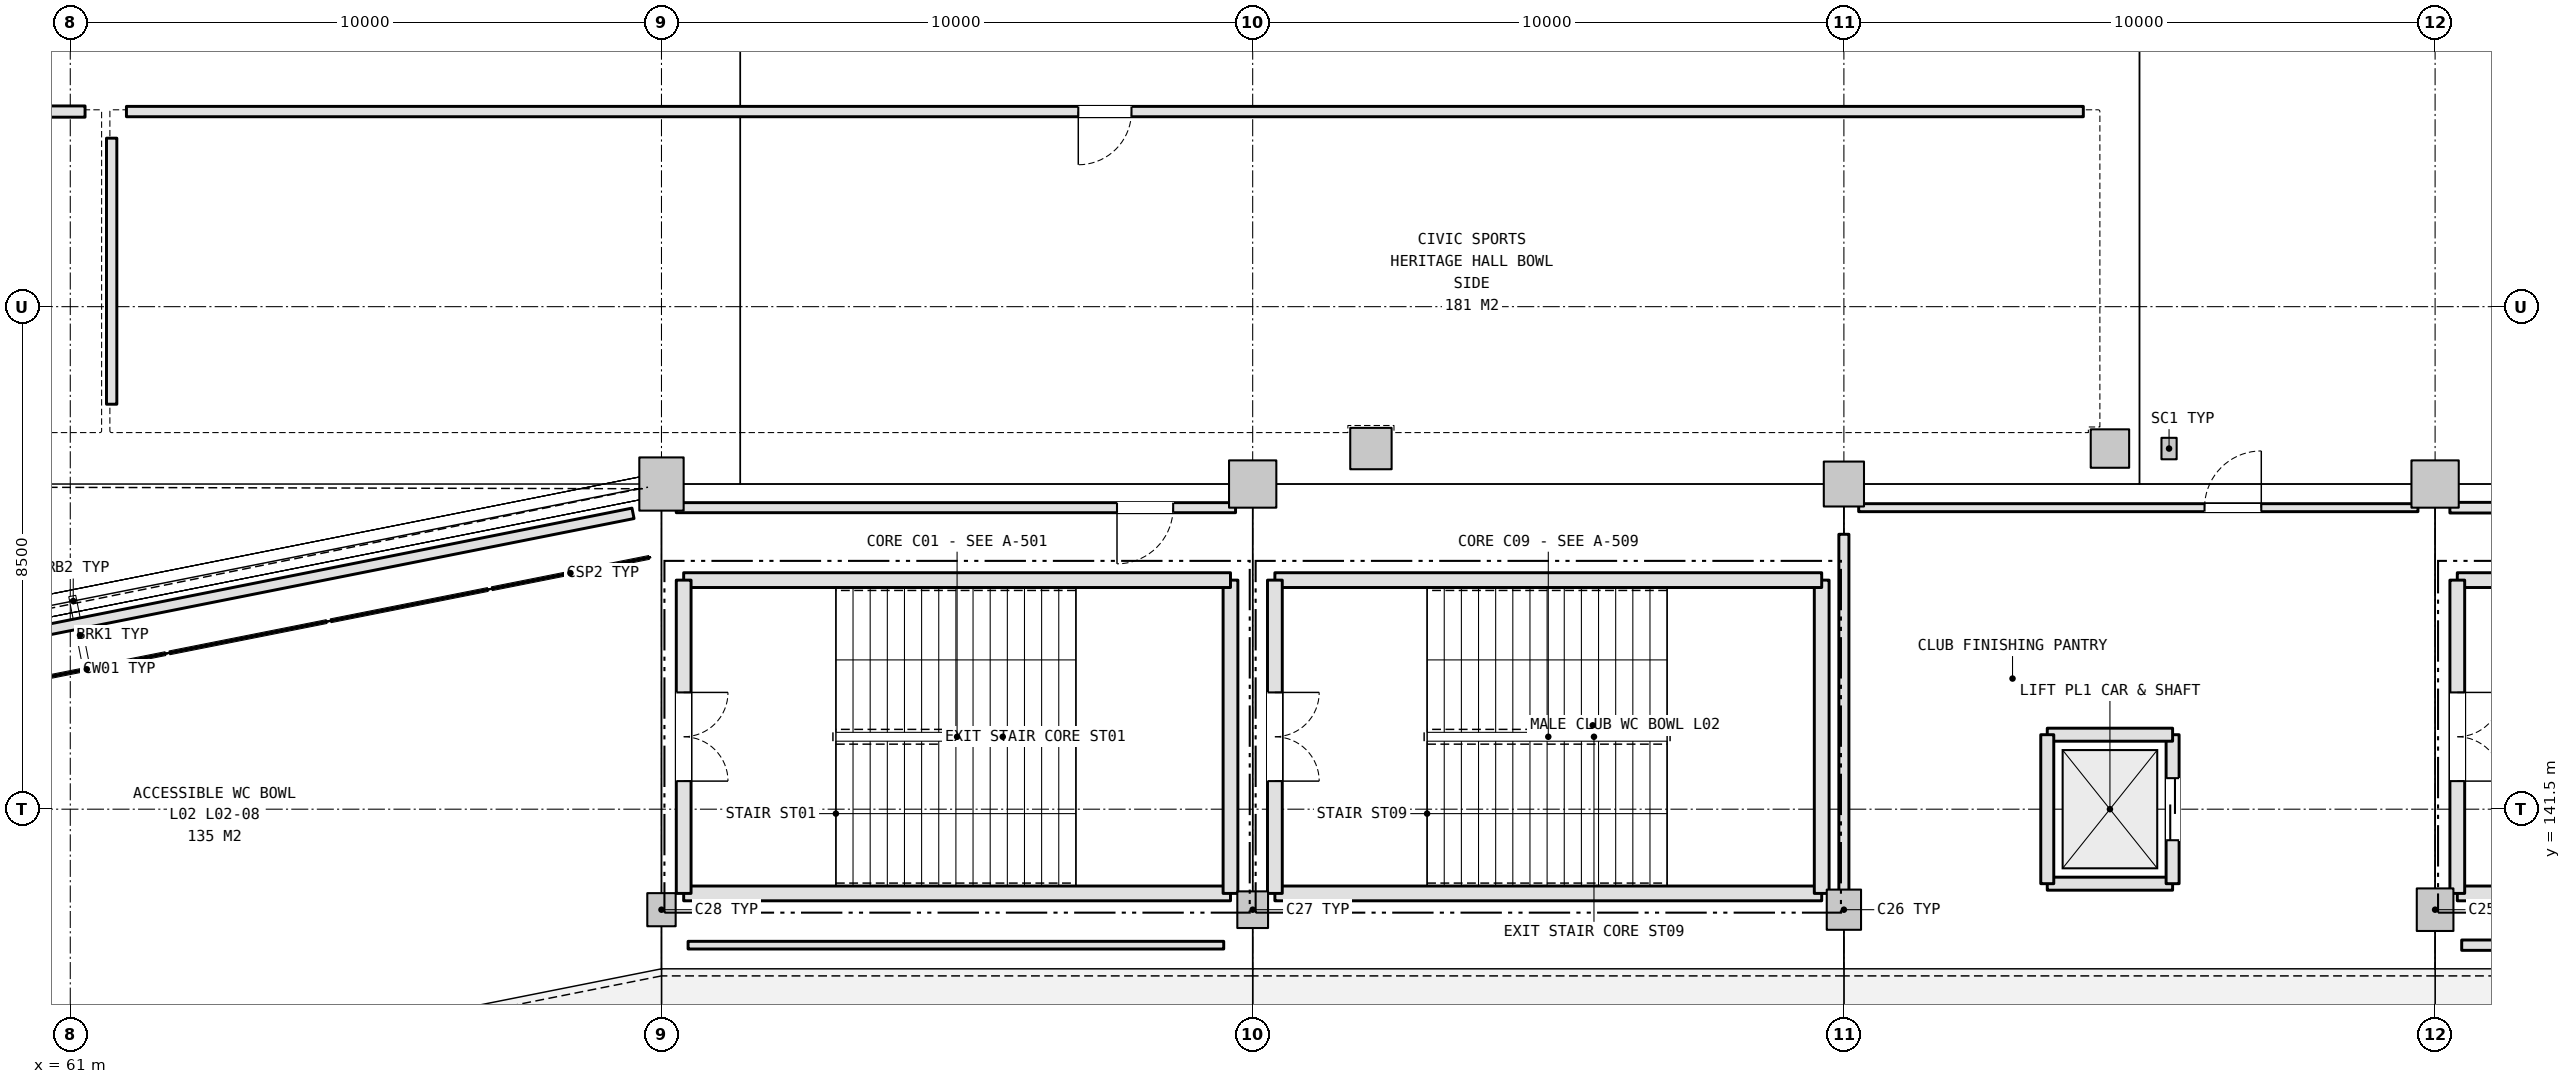
"""IFC4 building model, lengths in metres.
Left out: names, types, materials, properties, quantities, classifications, styles, units other than length and angle.
Written with IfcOpenShell. Run it as: python <this file> out.ifc"""

import sys

from ifc_helpers import new_model, si_unit, direction, frame, frame_2d, origin, origin_2d, place, context, subcontext, project, spatial, rectangle, i_section, extrude, element, fill, save


model = new_model("IFC4")
c1 = context("Model", 3, precision=1e-05, world=origin(), true_north=direction((0.0, 1.0)))
c2 = subcontext(c1, "Body", "Model", "MODEL_VIEW")
j1 = project(units=[si_unit("LENGTHUNIT", "METRE"), si_unit("PLANEANGLEUNIT", "RADIAN")], contexts=[c1])
p1 = place(None, origin())
s1 = spatial("IfcSite", under=j1, at=p1, CompositionType="ELEMENT")
p2 = place(p1, origin())
s2 = spatial("IfcBuilding", under=s1, at=p2, CompositionType="ELEMENT")
p3 = place(p2, frame((0.0, 0.0, 10.8)))
s3 = spatial("IfcBuildingStorey", under=s2, at=p3, CompositionType="ELEMENT", Elevation=10.8)
p4 = place(p3, frame((101.0, 139.8, 0.0), z_axis=(0.0, 0.0, 1.0), x_axis=(1.0, 0.0, 0.0)))
e1 = element("IfcColumn", 1, at=p4, inside=s3, PredefinedType="COLUMN", context=c2, shape_type="SweptSolid", body=[
    extrude(rectangle(XDim=0.62, YDim=0.72, at=origin_2d()), origin(), (0.0, 0.0, 1.0), 5.4),
])
p5 = place(p3, frame((101.0, 147.0, 0.0), z_axis=(0.0, 0.0, 1.0), x_axis=(1.0, 0.0, 0.0)))
e2 = element("IfcColumn", 2, at=p5, inside=s3, PredefinedType="COLUMN", context=c2, shape_type="SweptSolid", body=[
    extrude(rectangle(XDim=0.8, YDim=0.8, at=origin_2d()), origin(), (0.0, 0.0, 1.0), 5.4),
])
p6 = place(p3, frame((91.0, 139.8, 0.0), z_axis=(0.0, 0.0, 1.0), x_axis=(1.0, 0.0, 0.0)))
e3 = element("IfcColumn", 3, at=p6, inside=s3, PredefinedType="COLUMN", context=c2, shape_type="SweptSolid", body=[
    extrude(rectangle(XDim=0.58, YDim=0.68, at=origin_2d()), origin(), (0.0, 0.0, 1.0), 5.4),
])
p7 = place(p3, frame((91.0, 147.0, 0.0), z_axis=(0.0, 0.0, 1.0), x_axis=(1.0, 0.0, 0.0)))
e4 = element("IfcColumn", 4, at=p7, inside=s3, PredefinedType="COLUMN", context=c2, shape_type="SweptSolid", body=[
    extrude(rectangle(XDim=0.68, YDim=0.76, at=origin_2d()), origin(), (0.0, 0.0, 1.0), 5.4),
])
p8 = place(p3, frame((81.0, 139.8, 0.0), z_axis=(0.0, 0.0, 1.0), x_axis=(1.0, 0.0, 0.0)))
e5 = element("IfcColumn", 5, at=p8, inside=s3, PredefinedType="COLUMN", context=c2, shape_type="SweptSolid", body=[
    extrude(rectangle(XDim=0.52, YDim=0.62, at=origin_2d()), origin(), (0.0, 0.0, 1.0), 5.4),
])
p9 = place(p3, frame((81.0, 147.0, 0.0), z_axis=(0.0, 0.0, 1.0), x_axis=(1.0, 0.0, 0.0)))
e6 = element("IfcColumn", 6, at=p9, inside=s3, PredefinedType="COLUMN", context=c2, shape_type="SweptSolid", body=[
    extrude(rectangle(XDim=0.8, YDim=0.8, at=origin_2d()), origin(), (0.0, 0.0, 1.0), 5.4),
])
p10 = place(p3, frame((71.0, 139.8, 0.0), z_axis=(0.0, 0.0, 1.0), x_axis=(1.0, 0.0, 0.0)))
e7 = element("IfcColumn", 7, at=p10, inside=s3, PredefinedType="COLUMN", context=c2, shape_type="SweptSolid", body=[
    extrude(rectangle(XDim=0.48, YDim=0.56, at=origin_2d()), origin(), (0.0, 0.0, 1.0), 5.4),
])
p11 = place(p3, frame((71.0, 147.0, 0.0), z_axis=(0.0, 0.0, 1.0), x_axis=(1.0, 0.0, 0.0)))
e8 = element("IfcColumn", 8, at=p11, inside=s3, PredefinedType="COLUMN", context=c2, shape_type="SweptSolid", body=[
    extrude(rectangle(XDim=0.75, YDim=0.9, at=origin_2d()), origin(), (0.0, 0.0, 1.0), 5.4),
])
p12 = place(p3, frame((83.0, 147.6, 0.0), z_axis=(0.0, 0.0, 1.0), x_axis=(1.0, 0.0, 0.0)))
e9 = element("IfcColumn", 9, at=p12, inside=s3, PredefinedType="COLUMN", context=c2, shape_type="SweptSolid", body=[
    extrude(rectangle(XDim=0.7, YDim=0.7, at=origin_2d()), origin(), (0.0, 0.0, 1.0), 5.4),
])
p13 = place(p3, frame((95.5, 147.6, 0.0), z_axis=(0.0, 0.0, 1.0), x_axis=(1.0, 0.0, 0.0)))
e10 = element("IfcColumn", 10, at=p13, inside=s3, PredefinedType="COLUMN", context=c2, shape_type="SweptSolid", body=[
    extrude(rectangle(XDim=0.65, YDim=0.65, at=origin_2d()), origin(), (0.0, 0.0, 1.0), 5.4),
])
p14 = place(p3, frame((96.5, 147.6, 0.0), z_axis=(0.0, 0.0, 1.0), x_axis=(1.0, 0.0, 0.0)))
e11 = element("IfcColumn", 11, at=p14, inside=s3, PredefinedType="COLUMN", context=c2, shape_type="SweptSolid", body=[
    extrude(i_section(OverallWidth=0.257, OverallDepth=0.363, WebThickness=0.013, FlangeThickness=0.022, FilletRadius=0.015, at=origin_2d()), origin(), (0.0, 0.0, 1.0), 5.4),
])
p15 = place(p3, frame((71.375, 140.075, 0.0), z_axis=(0.0, 0.0, 1.0), x_axis=(1.0, 0.0, 0.0)))
e12 = element("IfcWall", 12, at=p15, inside=s3, PredefinedType="SHEAR", context=c2, shape_type="SweptSolid", body=[
    extrude(rectangle(XDim=9.249, YDim=0.25, at=frame_2d((4.625, 0.0))), origin(), (0.0, 0.0, 1.0), 5.15),
])
p16 = place(p3, frame((80.625, 140.075, 0.0), z_axis=(0.0, 0.0, 1.0), x_axis=(0.0, 1.0, 0.0)))
e13 = element("IfcWall", 13, at=p16, inside=s3, PredefinedType="SHEAR", context=c2, shape_type="SweptSolid", body=[
    extrude(rectangle(XDim=5.299, YDim=0.25, at=frame_2d((2.649, 0.0))), origin(), (0.0, 0.0, 1.0), 5.15),
])
p17 = place(p3, frame((80.625, 145.375, 0.0), z_axis=(0.0, 0.0, 1.0), x_axis=(-1.0, 0.0, 0.0)))
e14 = element("IfcWall", 14, at=p17, inside=s3, PredefinedType="SHEAR", context=c2, shape_type="SweptSolid", body=[
    extrude(rectangle(XDim=9.249, YDim=0.25, at=frame_2d((4.625, 0.0))), origin(), (0.0, 0.0, 1.0), 5.15),
])
p18 = place(p3, frame((71.375, 145.375, 0.0), z_axis=(0.0, 0.0, 1.0), x_axis=(0.0, -1.0, 0.0)))
e15 = element("IfcWall", 15, at=p18, inside=s3, PredefinedType="SHEAR", context=c2, shape_type="SweptSolid", body=[
    extrude(rectangle(XDim=5.299, YDim=0.25, at=frame_2d((2.649, 0.0))), origin(), (0.0, 0.0, 1.0), 5.15),
])
p19 = place(p18, frame((1.9, 0.0, 0.0)))
e16 = element("IfcOpeningElement", 16, at=p19, cuts=e15, PredefinedType="OPENING", context=c2, shape_type="SweptSolid", body=[
    extrude(rectangle(XDim=1.5, YDim=2.2, at=frame_2d((0.75, 1.1))), frame((0.0, 0.135, 0.0), z_axis=(0.0, -1.0, 0.0), x_axis=(1.0, 0.0, 0.0)), (0.0, 0.0, 1.0), 0.27),
])
p20 = place(p3, frame((81.375, 140.075, 0.0), z_axis=(0.0, 0.0, 1.0), x_axis=(1.0, 0.0, 0.0)))
e17 = element("IfcWall", 17, at=p20, inside=s3, PredefinedType="SHEAR", context=c2, shape_type="SweptSolid", body=[
    extrude(rectangle(XDim=9.249, YDim=0.25, at=frame_2d((4.625, 0.0))), origin(), (0.0, 0.0, 1.0), 5.15),
])
p21 = place(p3, frame((90.625, 140.075, 0.0), z_axis=(0.0, 0.0, 1.0), x_axis=(0.0, 1.0, 0.0)))
e18 = element("IfcWall", 18, at=p21, inside=s3, PredefinedType="SHEAR", context=c2, shape_type="SweptSolid", body=[
    extrude(rectangle(XDim=5.299, YDim=0.25, at=frame_2d((2.649, 0.0))), origin(), (0.0, 0.0, 1.0), 5.15),
])
p22 = place(p3, frame((90.625, 145.375, 0.0), z_axis=(0.0, 0.0, 1.0), x_axis=(-1.0, 0.0, 0.0)))
e19 = element("IfcWall", 19, at=p22, inside=s3, PredefinedType="SHEAR", context=c2, shape_type="SweptSolid", body=[
    extrude(rectangle(XDim=9.249, YDim=0.25, at=frame_2d((4.625, 0.0))), origin(), (0.0, 0.0, 1.0), 5.15),
])
p23 = place(p3, frame((81.375, 145.375, 0.0), z_axis=(0.0, 0.0, 1.0), x_axis=(0.0, -1.0, 0.0)))
e20 = element("IfcWall", 20, at=p23, inside=s3, PredefinedType="SHEAR", context=c2, shape_type="SweptSolid", body=[
    extrude(rectangle(XDim=5.299, YDim=0.25, at=frame_2d((2.649, 0.0))), origin(), (0.0, 0.0, 1.0), 5.15),
])
p24 = place(p23, frame((1.9, 0.0, 0.0)))
e21 = element("IfcOpeningElement", 21, at=p24, cuts=e20, PredefinedType="OPENING", context=c2, shape_type="SweptSolid", body=[
    extrude(rectangle(XDim=1.5, YDim=2.2, at=frame_2d((0.75, 1.1))), frame((0.0, 0.135, 0.0), z_axis=(0.0, -1.0, 0.0), x_axis=(1.0, 0.0, 0.0)), (0.0, 0.0, 1.0), 0.27),
])
for number, where, z_axis, x_axis in (
    (22, (101.375, 140.075, 0.0), (0.0, 0.0, 1.0), (1.0, 0.0, 0.0)),
    (23, (110.625, 145.375, 0.0), (0.0, 0.0, 1.0), (-1.0, 0.0, 0.0)),
):
    element("IfcWall", number, at=place(p3, frame(where, z_axis=z_axis, x_axis=x_axis)), inside=s3, PredefinedType="SHEAR", context=c2, shape_type="SweptSolid", body=[
        extrude(rectangle(XDim=9.249, YDim=0.25, at=frame_2d((4.625, 0.0))), origin(), (0.0, 0.0, 1.0), 5.15),
    ])
p25 = place(p3, frame((101.375, 145.375, 0.0), z_axis=(0.0, 0.0, 1.0), x_axis=(0.0, -1.0, 0.0)))
e24 = element("IfcWall", 24, at=p25, inside=s3, PredefinedType="SHEAR", context=c2, shape_type="SweptSolid", body=[
    extrude(rectangle(XDim=5.299, YDim=0.25, at=frame_2d((2.649, 0.0))), origin(), (0.0, 0.0, 1.0), 5.15),
])
p26 = place(p25, frame((1.9, 0.0, 0.0)))
e25 = element("IfcOpeningElement", 25, at=p26, cuts=e24, PredefinedType="OPENING", context=c2, shape_type="SweptSolid", body=[
    extrude(rectangle(XDim=1.5, YDim=2.2, at=frame_2d((0.75, 1.1))), frame((0.0, 0.135, 0.0), z_axis=(0.0, -1.0, 0.0), x_axis=(1.0, 0.0, 0.0)), (0.0, 0.0, 1.0), 0.27),
])
p27 = place(p3, frame((94.44, 140.24, 0.0), z_axis=(0.0, 0.0, 1.0), x_axis=(1.0, 0.0, 0.0)))
e26 = element("IfcWall", 26, at=p27, inside=s3, PredefinedType="SHEAR", context=c2, shape_type="SweptSolid", body=[
    extrude(rectangle(XDim=2.12, YDim=0.22, at=frame_2d((1.06, 0.0))), origin(), (0.0, 0.0, 1.0), 5.15),
])
p28 = place(p3, frame((96.56, 140.24, 0.0), z_axis=(0.0, 0.0, 1.0), x_axis=(0.0, 1.0, 0.0)))
e27 = element("IfcWall", 27, at=p28, inside=s3, PredefinedType="SHEAR", context=c2, shape_type="SweptSolid", body=[
    extrude(rectangle(XDim=2.52, YDim=0.22, at=frame_2d((1.26, 0.0))), origin(), (0.0, 0.0, 1.0), 5.15),
])
p29 = place(p28, frame((0.735, 0.0, 0.0)))
e28 = element("IfcOpeningElement", 28, at=p29, cuts=e27, PredefinedType="OPENING", context=c2, shape_type="SweptSolid", body=[
    extrude(rectangle(XDim=1.05, YDim=2.15, at=frame_2d((0.525, 1.075))), frame((0.0, 0.12, 0.0), z_axis=(0.0, -1.0, 0.0), x_axis=(1.0, 0.0, 0.0)), (0.0, 0.0, 1.0), 0.24),
])
p30 = place(p3, frame((96.56, 142.76, 0.0), z_axis=(0.0, 0.0, 1.0), x_axis=(-1.0, 0.0, 0.0)))
e29 = element("IfcWall", 29, at=p30, inside=s3, PredefinedType="SHEAR", context=c2, shape_type="SweptSolid", body=[
    extrude(rectangle(XDim=2.12, YDim=0.22, at=frame_2d((1.06, 0.0))), origin(), (0.0, 0.0, 1.0), 5.15),
])
p31 = place(p3, frame((94.44, 142.76, 0.0), z_axis=(0.0, 0.0, 1.0), x_axis=(0.0, -1.0, 0.0)))
e30 = element("IfcWall", 30, at=p31, inside=s3, PredefinedType="SHEAR", context=c2, shape_type="SweptSolid", body=[
    extrude(rectangle(XDim=2.52, YDim=0.22, at=frame_2d((1.26, 0.0))), origin(), (0.0, 0.0, 1.0), 5.15),
])
p32 = place(p3, frame((25.95, 153.3, 0.0), z_axis=(0.0, 0.0, 1.0), x_axis=(1.0, 0.0, 0.0)))
e31 = element("IfcWall", 31, at=p32, inside=s3, PredefinedType="PARTITIONING", context=c2, shape_type="SweptSolid", body=[
    extrude(rectangle(XDim=35.3, YDim=0.19, at=frame_2d((17.65, 0.0))), origin(), (0.0, 0.0, 1.0), 4.505),
])
p33 = place(p32, frame((17.95, 0.0, 0.0)))
e32 = element("IfcOpeningElement", 32, at=p33, cuts=e31, PredefinedType="OPENING", context=c2, shape_type="SweptSolid", body=[
    extrude(rectangle(XDim=1.8, YDim=2.2, at=frame_2d((0.9, 1.1))), frame((0.0, 0.105, 0.0), z_axis=(0.0, -1.0, 0.0), x_axis=(1.0, 0.0, 0.0)), (0.0, 0.0, 1.0), 0.21),
])
p34 = place(p3, frame((61.95, 153.3, 0.0), z_axis=(0.0, 0.0, 1.0), x_axis=(1.0, 0.0, 0.0)))
e33 = element("IfcWall", 33, at=p34, inside=s3, PredefinedType="PARTITIONING", context=c2, shape_type="SweptSolid", body=[
    extrude(rectangle(XDim=33.1, YDim=0.175, at=frame_2d((16.55, 0.0))), origin(), (0.0, 0.0, 1.0), 4.505),
])
p35 = place(p34, frame((16.1, 0.0, 0.0)))
e34 = element("IfcOpeningElement", 34, at=p35, cuts=e33, PredefinedType="OPENING", context=c2, shape_type="SweptSolid", body=[
    extrude(rectangle(XDim=0.9, YDim=2.1, at=frame_2d((0.45, 1.05))), frame((0.0, 0.097, 0.0), z_axis=(0.0, -1.0, 0.0), x_axis=(1.0, 0.0, 0.0)), (0.0, 0.0, 1.0), 0.195),
])
p36 = place(p3, frame((61.7, 148.35, 0.0), z_axis=(0.0, 0.0, 1.0), x_axis=(0.0, 1.0, 0.0)))
e35 = element("IfcWall", 35, at=p36, inside=s3, PredefinedType="PARTITIONING", context=c2, shape_type="SweptSolid", body=[
    extrude(rectangle(XDim=4.5, YDim=0.175, at=frame_2d((2.25, 0.0))), origin(), (0.0, 0.0, 1.0), 4.655),
])
p37 = place(p3, frame((101.25, 146.6, 0.0), z_axis=(0.0, 0.0, 1.0), x_axis=(1.0, 0.0, 0.0)))
e36 = element("IfcWall", 36, at=p37, inside=s3, PredefinedType="PARTITIONING", context=c2, shape_type="SweptSolid", body=[
    extrude(rectangle(XDim=9.46, YDim=0.18, at=frame_2d((4.73, 0.0))), origin(), (0.0, 0.0, 1.0), 4.215),
])
p38 = place(p37, frame((7.68, 0.0, 0.0)))
e37 = element("IfcOpeningElement", 37, at=p38, cuts=e36, PredefinedType="OPENING", context=c2, shape_type="SweptSolid", body=[
    extrude(rectangle(XDim=1.3, YDim=2.2, at=frame_2d((0.65, 1.1))), frame((0.0, 0.1, 0.0), z_axis=(0.0, -1.0, 0.0), x_axis=(1.0, 0.0, 0.0)), (0.0, 0.0, 1.0), 0.2),
])
p39 = place(p3, frame((110.51, 139.2, 0.0), z_axis=(0.0, 0.0, 1.0), x_axis=(-1.0, 0.0, 0.0)))
e38 = element("IfcWall", 38, at=p39, inside=s3, PredefinedType="PARTITIONING", context=c2, shape_type="SweptSolid", body=[
    extrude(rectangle(XDim=9.06, YDim=0.175, at=frame_2d((4.53, 0.0))), origin(), (0.0, 0.0, 1.0), 5.12),
])
p40 = place(p3, frame((91.25, 146.6, 0.0), z_axis=(0.0, 0.0, 1.0), x_axis=(1.0, 0.0, 0.0)))
e39 = element("IfcWall", 39, at=p40, inside=s3, PredefinedType="PARTITIONING", context=c2, shape_type="SweptSolid", body=[
    extrude(rectangle(XDim=9.46, YDim=0.135, at=frame_2d((4.73, 0.0))), origin(), (0.0, 0.0, 1.0), 4.255),
])
p41 = place(p40, frame((5.85, 0.0, 0.0)))
e40 = element("IfcOpeningElement", 40, at=p41, cuts=e39, PredefinedType="OPENING", context=c2, shape_type="SweptSolid", body=[
    extrude(rectangle(XDim=0.96, YDim=2.15, at=frame_2d((0.48, 1.075))), frame((0.0, 0.077, 0.0), z_axis=(0.0, -1.0, 0.0), x_axis=(1.0, 0.0, 0.0)), (0.0, 0.0, 1.0), 0.155),
])
p42 = place(p3, frame((91.0, 139.65, 0.0), z_axis=(0.0, 0.0, 1.0), x_axis=(0.0, 1.0, 0.0)))
e41 = element("IfcWall", 41, at=p42, inside=s3, PredefinedType="PARTITIONING", context=c2, shape_type="SweptSolid", body=[
    extrude(rectangle(XDim=6.5, YDim=0.17, at=frame_2d((3.25, 0.0))), origin(), (0.0, 0.0, 1.0), 4.285),
])
p43 = place(p3, frame((71.25, 146.6, 0.0), z_axis=(0.0, 0.0, 1.0), x_axis=(1.0, 0.0, 0.0)))
e42 = element("IfcWall", 42, at=p43, inside=s3, PredefinedType="PARTITIONING", context=c2, shape_type="SweptSolid", body=[
    extrude(rectangle(XDim=9.46, YDim=0.17, at=frame_2d((4.73, 0.0))), origin(), (0.0, 0.0, 1.0), 4.215),
])
p44 = place(p43, frame((7.455, 0.0, 0.0)))
e43 = element("IfcOpeningElement", 43, at=p44, cuts=e42, PredefinedType="OPENING", context=c2, shape_type="SweptSolid", body=[
    extrude(rectangle(XDim=0.95, YDim=2.15, at=frame_2d((0.475, 1.075))), frame((0.0, 0.095, 0.0), z_axis=(0.0, -1.0, 0.0), x_axis=(1.0, 0.0, 0.0)), (0.0, 0.0, 1.0), 0.19),
])
p45 = place(p3, frame((80.51, 139.2, 0.0), z_axis=(0.0, 0.0, 1.0), x_axis=(-1.0, 0.0, 0.0)))
e44 = element("IfcWall", 44, at=p45, inside=s3, PredefinedType="PARTITIONING", context=c2, shape_type="SweptSolid", body=[
    extrude(rectangle(XDim=9.06, YDim=0.13, at=frame_2d((4.53, 0.0))), origin(), (0.0, 0.0, 1.0), 5.12),
])
p46 = place(p3, frame((51.695, 142.76, 0.0), z_axis=(0.0, 0.0, 1.0), x_axis=(0.98078659802, 0.195083697793, 0.0)))
e45 = element("IfcWall", 45, at=p46, inside=s3, PredefinedType="PARTITIONING", context=c2, shape_type="SweptSolid", body=[
    extrude(rectangle(XDim=19.192, YDim=0.18, at=frame_2d((9.596, 0.0))), origin(), (0.0, 0.0, 1.0), 5.12),
])
p47 = place(p19, origin())
e46 = element("IfcDoor", 46, at=p47, inside=s3, OperationType="DOUBLE_DOOR_SINGLE_SWING", PredefinedType="DOOR", context=c2, shape_type="SweptSolid", body=[
    extrude(rectangle(XDim=1.5, YDim=2.2, at=frame_2d((0.75, 1.1))), frame((0.0, 0.025, 0.0), z_axis=(0.0, -1.0, 0.0), x_axis=(1.0, 0.0, 0.0)), (0.0, 0.0, 1.0), 0.05),
])
fill(e16, e46)
p48 = place(p24, origin())
e47 = element("IfcDoor", 47, at=p48, inside=s3, OperationType="DOUBLE_DOOR_SINGLE_SWING", PredefinedType="DOOR", context=c2, shape_type="SweptSolid", body=[
    extrude(rectangle(XDim=1.5, YDim=2.2, at=frame_2d((0.75, 1.1))), frame((0.0, 0.025, 0.0), z_axis=(0.0, -1.0, 0.0), x_axis=(1.0, 0.0, 0.0)), (0.0, 0.0, 1.0), 0.05),
])
fill(e21, e47)
p49 = place(p26, origin())
e48 = element("IfcDoor", 48, at=p49, inside=s3, OperationType="DOUBLE_DOOR_SINGLE_SWING", PredefinedType="DOOR", context=c2, shape_type="SweptSolid", body=[
    extrude(rectangle(XDim=1.5, YDim=2.2, at=frame_2d((0.75, 1.1))), frame((0.0, 0.025, 0.0), z_axis=(0.0, -1.0, 0.0), x_axis=(1.0, 0.0, 0.0)), (0.0, 0.0, 1.0), 0.05),
])
fill(e25, e48)
p50 = place(p29, origin())
e49 = element("IfcDoor", 49, at=p50, inside=s3, OperationType="DOUBLE_DOOR_SLIDING", PredefinedType="DOOR", context=c2, shape_type="SweptSolid", body=[
    extrude(rectangle(XDim=1.05, YDim=2.15, at=frame_2d((0.525, 1.075))), frame((0.0, 0.025, 0.0), z_axis=(0.0, -1.0, 0.0), x_axis=(1.0, 0.0, 0.0)), (0.0, 0.0, 1.0), 0.05),
])
fill(e28, e49)
p51 = place(p35, frame((0.9, 0.0, 0.0), z_axis=(0.0, 0.0, 1.0), x_axis=(-1.0, 0.0, 0.0)))
e50 = element("IfcDoor", 50, at=p51, inside=s3, OperationType="SINGLE_SWING_LEFT", PredefinedType="DOOR", context=c2, shape_type="SweptSolid", body=[
    extrude(rectangle(XDim=0.9, YDim=2.1, at=frame_2d((0.45, 1.05))), frame((0.0, 0.025, 0.0), z_axis=(0.0, -1.0, 0.0), x_axis=(1.0, 0.0, 0.0)), (0.0, 0.0, 1.0), 0.05),
])
fill(e34, e50)
p52 = place(p41, origin())
e51 = element("IfcDoor", 51, at=p52, inside=s3, OperationType="SINGLE_SWING_RIGHT", PredefinedType="DOOR", context=c2, shape_type="SweptSolid", body=[
    extrude(rectangle(XDim=0.96, YDim=2.15, at=frame_2d((0.48, 1.075))), frame((0.0, 0.025, 0.0), z_axis=(0.0, -1.0, 0.0), x_axis=(1.0, 0.0, 0.0)), (0.0, 0.0, 1.0), 0.05),
])
fill(e40, e51)
p53 = place(p44, frame((0.95, 0.0, 0.0), z_axis=(0.0, 0.0, 1.0), x_axis=(-1.0, 0.0, 0.0)))
e52 = element("IfcDoor", 52, at=p53, inside=s3, OperationType="SINGLE_SWING_LEFT", PredefinedType="DOOR", context=c2, shape_type="SweptSolid", body=[
    extrude(rectangle(XDim=0.95, YDim=2.15, at=frame_2d((0.475, 1.075))), frame((0.0, 0.025, 0.0), z_axis=(0.0, -1.0, 0.0), x_axis=(1.0, 0.0, 0.0)), (0.0, 0.0, 1.0), 0.05),
])
fill(e43, e52)
save(model, sys.argv[1])
